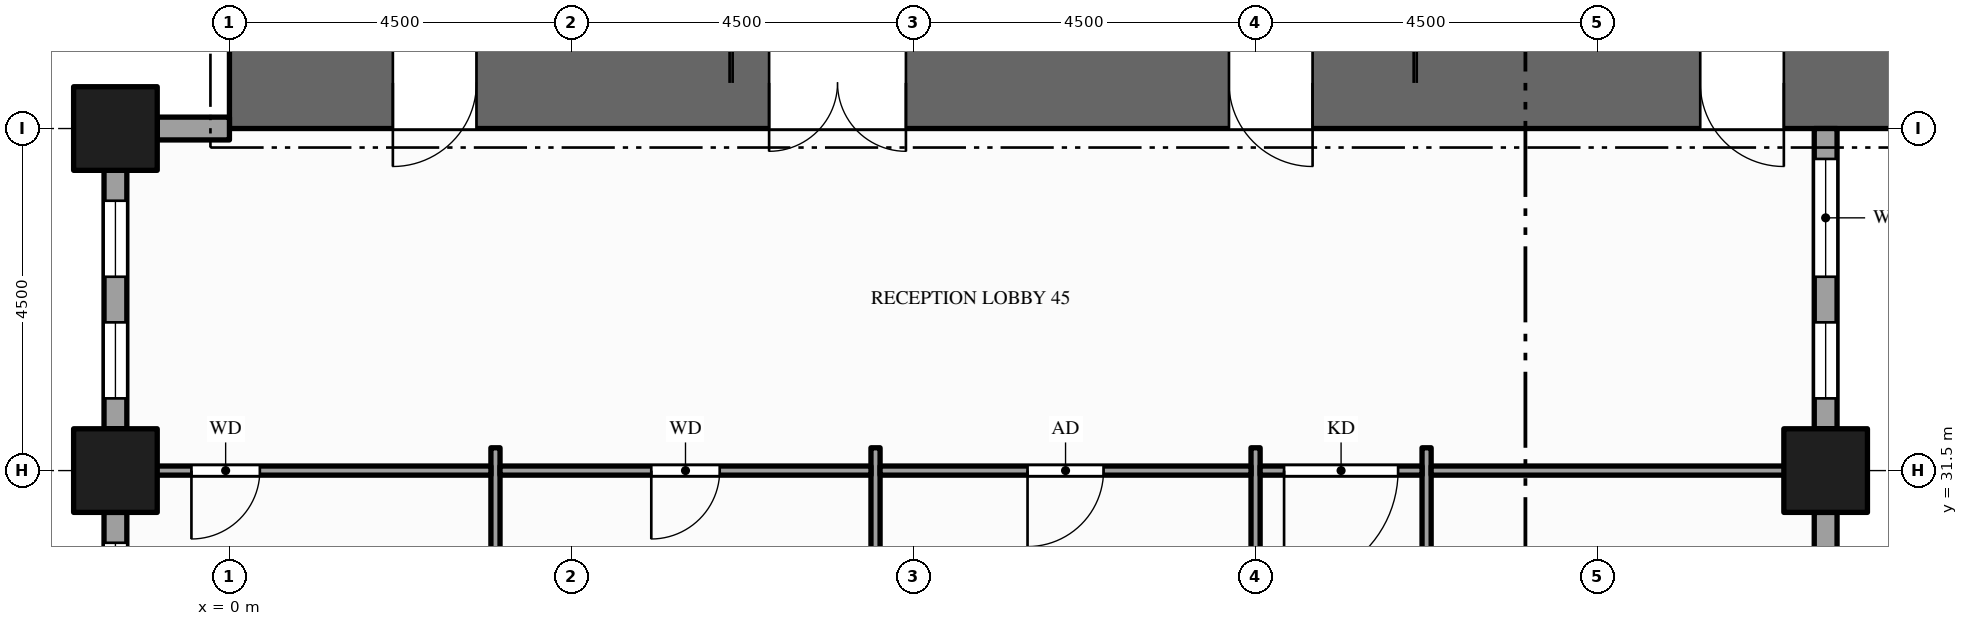
"""IFC4 building model, lengths in metres.
Left out: names, types, materials, properties, quantities, classifications, styles, units other than length and angle.
Written with IfcOpenShell. Run it as: python <this file> out.ifc"""

import sys

from ifc_helpers import new_model, si_unit, direction, frame, frame_2d, origin, origin_2d, place, context, subcontext, project, spatial, rectangle, hollow_rectangle, extrude, element, fill, save


model = new_model("IFC4")
c1 = context("Model", 3, precision=1e-05, world=origin(), true_north=direction((0.0, 1.0)))
c2 = subcontext(c1, "Body", "Model", "MODEL_VIEW")
j1 = project(units=[si_unit("LENGTHUNIT", "METRE"), si_unit("PLANEANGLEUNIT", "RADIAN")], contexts=[c1])
p1 = place(None, origin())
s1 = spatial("IfcSite", under=j1, at=p1, CompositionType="ELEMENT")
p2 = place(p1, origin())
s2 = spatial("IfcBuilding", under=s1, at=p2, CompositionType="ELEMENT")
p3 = place(p2, frame((0.0, 0.0, 61.0)))
s3 = spatial("IfcBuildingStorey", under=s2, at=p3, CompositionType="ELEMENT", Elevation=61.0)
p4 = place(p3, frame((0.0, 36.6, -0.15), z_axis=(0.0, 0.0, 1.0), x_axis=(1.0, 0.0, 0.0)))
e1 = element("IfcWall", 1, at=p4, inside=s3, PredefinedType="SHEAR", context=c2, shape_type="SweptSolid", body=[
    extrude(rectangle(XDim=22.5, YDim=1.2, at=frame_2d((11.25, 0.0))), origin(), (0.0, 0.0, 1.0), 4.0),
])
p5 = place(p4, frame((7.1, 0.0, 0.15)))
e2 = element("IfcOpeningElement", 2, at=p5, cuts=e1, PredefinedType="OPENING", context=c2, shape_type="SweptSolid", body=[
    extrude(rectangle(XDim=1.8, YDim=2.1, at=frame_2d((0.9, 1.05))), frame((0.0, 0.61, 0.0), z_axis=(0.0, -1.0, 0.0), x_axis=(1.0, 0.0, 0.0)), (0.0, 0.0, 1.0), 1.22),
])
p6 = place(p4, frame((13.15, 0.0, 0.15)))
e3 = element("IfcOpeningElement", 3, at=p6, cuts=e1, PredefinedType="OPENING", context=c2, shape_type="SweptSolid", body=[
    extrude(rectangle(XDim=1.1, YDim=2.1, at=frame_2d((0.55, 1.05))), frame((0.0, 0.61, 0.0), z_axis=(0.0, -1.0, 0.0), x_axis=(1.0, 0.0, 0.0)), (0.0, 0.0, 1.0), 1.22),
])
p7 = place(p4, frame((2.15, 0.0, 0.15)))
e4 = element("IfcOpeningElement", 4, at=p7, cuts=e1, PredefinedType="OPENING", context=c2, shape_type="SweptSolid", body=[
    extrude(rectangle(XDim=1.1, YDim=2.1, at=frame_2d((0.55, 1.05))), frame((0.0, 0.61, 0.0), z_axis=(0.0, -1.0, 0.0), x_axis=(1.0, 0.0, 0.0)), (0.0, 0.0, 1.0), 1.22),
])
p8 = place(p4, frame((19.35, 0.0, 0.15)))
e5 = element("IfcOpeningElement", 5, at=p8, cuts=e1, PredefinedType="OPENING", context=c2, shape_type="SweptSolid", body=[
    extrude(rectangle(XDim=1.1, YDim=2.1, at=frame_2d((0.55, 1.05))), frame((0.0, 0.61, 0.0), z_axis=(0.0, -1.0, 0.0), x_axis=(1.0, 0.0, 0.0)), (0.0, 0.0, 1.0), 1.22),
])
for number, where, z_axis, x_axis in (
    (6, (-1.5, 31.5, -0.15), (0.0, 0.0, 1.0), (1.0, 0.0, 0.0)),
    (7, (-1.5, 36.0, -0.15), (0.0, 0.0, 1.0), (1.0, 0.0, 0.0)),
    (8, (21.0, 31.5, -0.15), (0.0, 0.0, 1.0), (1.0, 0.0, 0.0)),
):
    element("IfcColumn", number, at=place(p3, frame(where, z_axis=z_axis, x_axis=x_axis)), inside=s3, PredefinedType="COLUMN", context=c2, shape_type="SweptSolid", body=[
        extrude(hollow_rectangle(XDim=1.1, YDim=1.1, WallThickness=0.06, at=origin_2d()), origin(), (0.0, 0.0, 1.0), 4.0),
    ])
p9 = place(p3, frame((21.0, 29.05, 0.0), z_axis=(0.0, 0.0, 1.0), x_axis=(0.0, 1.0, 0.0)))
e9 = element("IfcWall", 9, at=p9, inside=s3, PredefinedType="STANDARD", context=c2, shape_type="SweptSolid", body=[
    extrude(rectangle(XDim=1.9, YDim=0.3, at=frame_2d((0.95, 0.0))), origin(), (0.0, 0.0, 1.0), 3.144),
])
p10 = place(p3, frame((21.0, 32.05, 0.0), z_axis=(0.0, 0.0, 1.0), x_axis=(0.0, 1.0, 0.0)))
e10 = element("IfcWall", 10, at=p10, inside=s3, PredefinedType="STANDARD", context=c2, shape_type="SweptSolid", body=[
    extrude(rectangle(XDim=3.95, YDim=0.3, at=frame_2d((1.975, 0.0))), origin(), (0.0, 0.0, 1.0), 3.144),
])
p11 = place(p10, frame((0.4, 0.0, 0.9)))
e11 = element("IfcOpeningElement", 11, at=p11, cuts=e10, PredefinedType="OPENING", context=c2, shape_type="SweptSolid", body=[
    extrude(rectangle(XDim=1.0, YDim=2.0, at=frame_2d((0.5, 1.0))), frame((0.0, 0.16, 0.0), z_axis=(0.0, -1.0, 0.0), x_axis=(1.0, 0.0, 0.0)), (0.0, 0.0, 1.0), 0.32),
])
p12 = place(p10, frame((2.0, 0.0, 0.9)))
e12 = element("IfcOpeningElement", 12, at=p12, cuts=e10, PredefinedType="OPENING", context=c2, shape_type="SweptSolid", body=[
    extrude(rectangle(XDim=1.55, YDim=2.0, at=frame_2d((0.775, 1.0))), frame((0.0, 0.16, 0.0), z_axis=(0.0, -1.0, 0.0), x_axis=(1.0, 0.0, 0.0)), (0.0, 0.0, 1.0), 0.32),
])
p13 = place(p3, frame((0.0, 36.0, 0.0), z_axis=(0.0, 0.0, 1.0), x_axis=(-1.0, 0.0, 0.0)))
e13 = element("IfcWall", 13, at=p13, inside=s3, PredefinedType="STANDARD", context=c2, shape_type="SweptSolid", body=[
    extrude(rectangle(XDim=0.95, YDim=0.3, at=frame_2d((0.475, 0.0))), origin(), (0.0, 0.0, 1.0), 2.938),
])
p14 = place(p3, frame((-1.5, 35.45, 0.0), z_axis=(0.0, 0.0, 1.0), x_axis=(0.0, -1.0, 0.0)))
e14 = element("IfcWall", 14, at=p14, inside=s3, PredefinedType="STANDARD", context=c2, shape_type="SweptSolid", body=[
    extrude(rectangle(XDim=3.4, YDim=0.3, at=frame_2d((1.7, 0.0))), origin(), (0.0, 0.0, 1.0), 3.144),
])
p15 = place(p14, frame((0.4, 0.0, 0.9)))
e15 = element("IfcOpeningElement", 15, at=p15, cuts=e14, PredefinedType="OPENING", context=c2, shape_type="SweptSolid", body=[
    extrude(rectangle(XDim=1.0, YDim=2.0, at=frame_2d((0.5, 1.0))), frame((0.0, 0.16, 0.0), z_axis=(0.0, -1.0, 0.0), x_axis=(1.0, 0.0, 0.0)), (0.0, 0.0, 1.0), 0.32),
])
p16 = place(p14, frame((2.0, 0.0, 0.9)))
e16 = element("IfcOpeningElement", 16, at=p16, cuts=e14, PredefinedType="OPENING", context=c2, shape_type="SweptSolid", body=[
    extrude(rectangle(XDim=1.0, YDim=2.0, at=frame_2d((0.5, 1.0))), frame((0.0, 0.16, 0.0), z_axis=(0.0, -1.0, 0.0), x_axis=(1.0, 0.0, 0.0)), (0.0, 0.0, 1.0), 0.32),
])
p17 = place(p3, frame((-1.5, 30.95, 0.0), z_axis=(0.0, 0.0, 1.0), x_axis=(0.0, -1.0, 0.0)))
e17 = element("IfcWall", 17, at=p17, inside=s3, PredefinedType="STANDARD", context=c2, shape_type="SweptSolid", body=[
    extrude(rectangle(XDim=3.4, YDim=0.3, at=frame_2d((1.7, 0.0))), origin(), (0.0, 0.0, 1.0), 3.144),
])
p18 = place(p17, frame((0.4, 0.0, 0.9)))
e18 = element("IfcOpeningElement", 18, at=p18, cuts=e17, PredefinedType="OPENING", context=c2, shape_type="SweptSolid", body=[
    extrude(rectangle(XDim=1.0, YDim=2.0, at=frame_2d((0.5, 1.0))), frame((0.0, 0.16, 0.0), z_axis=(0.0, -1.0, 0.0), x_axis=(1.0, 0.0, 0.0)), (0.0, 0.0, 1.0), 0.32),
])
p19 = place(p17, frame((2.0, 0.0, 0.9)))
e19 = element("IfcOpeningElement", 19, at=p19, cuts=e17, PredefinedType="OPENING", context=c2, shape_type="SweptSolid", body=[
    extrude(rectangle(XDim=1.0, YDim=2.0, at=frame_2d((0.5, 1.0))), frame((0.0, 0.16, 0.0), z_axis=(0.0, -1.0, 0.0), x_axis=(1.0, 0.0, 0.0)), (0.0, 0.0, 1.0), 0.32),
])
for number, where, z_axis, x_axis in (
    (20, (3.5, 26.7, 0.0), (0.0, 0.0, 1.0), (0.0, 1.0, 0.0)),
    (21, (8.5, 26.7, 0.0), (0.0, 0.0, 1.0), (0.0, 1.0, 0.0)),
):
    element("IfcWall", number, at=place(p3, frame(where, z_axis=z_axis, x_axis=x_axis)), inside=s3, PredefinedType="PARTITIONING", context=c2, shape_type="SweptSolid", body=[
        extrude(rectangle(XDim=5.1, YDim=0.12, at=frame_2d((2.55, 0.0))), origin(), (0.0, 0.0, 1.0), 3.85),
    ])
p20 = place(p3, frame((13.5, 10.95, 0.0), z_axis=(0.0, 0.0, 1.0), x_axis=(0.0, 1.0, 0.0)))
e22 = element("IfcWall", 22, at=p20, inside=s3, PredefinedType="PARTITIONING", context=c2, shape_type="SweptSolid", body=[
    extrude(rectangle(XDim=20.85, YDim=0.12, at=frame_2d((10.425, 0.0))), origin(), (0.0, 0.0, 1.0), 2.6),
])
p21 = place(p20, frame((2.05, 0.0, 0.0)))
e23 = element("IfcOpeningElement", 23, at=p21, cuts=e22, PredefinedType="OPENING", context=c2, shape_type="SweptSolid", body=[
    extrude(rectangle(XDim=1.0, YDim=2.1, at=frame_2d((0.5, 1.05))), frame((0.0, 0.07, 0.0), z_axis=(0.0, -1.0, 0.0), x_axis=(1.0, 0.0, 0.0)), (0.0, 0.0, 1.0), 0.14),
])
p22 = place(p20, frame((6.55, 0.0, 0.0)))
e24 = element("IfcOpeningElement", 24, at=p22, cuts=e22, PredefinedType="OPENING", context=c2, shape_type="SweptSolid", body=[
    extrude(rectangle(XDim=1.0, YDim=2.1, at=frame_2d((0.5, 1.05))), frame((0.0, 0.07, 0.0), z_axis=(0.0, -1.0, 0.0), x_axis=(1.0, 0.0, 0.0)), (0.0, 0.0, 1.0), 0.14),
])
p23 = place(p20, frame((11.805, 0.0, 0.0)))
e25 = element("IfcOpeningElement", 25, at=p23, cuts=e22, PredefinedType="OPENING", context=c2, shape_type="SweptSolid", body=[
    extrude(rectangle(XDim=1.8, YDim=2.1, at=frame_2d((0.9, 1.05))), frame((0.0, 0.07, 0.0), z_axis=(0.0, -1.0, 0.0), x_axis=(1.0, 0.0, 0.0)), (0.0, 0.0, 1.0), 0.14),
])
p24 = place(p3, frame((15.75, 10.95, 0.0), z_axis=(0.0, 0.0, 1.0), x_axis=(0.0, 1.0, 0.0)))
e26 = element("IfcWall", 26, at=p24, inside=s3, PredefinedType="PARTITIONING", context=c2, shape_type="SweptSolid", body=[
    extrude(rectangle(XDim=20.85, YDim=0.12, at=frame_2d((10.425, 0.0))), origin(), (0.0, 0.0, 1.0), 2.6),
])
p25 = place(p24, frame((17.8, 0.0, 0.0)))
e27 = element("IfcOpeningElement", 27, at=p25, cuts=e26, PredefinedType="OPENING", context=c2, shape_type="SweptSolid", body=[
    extrude(rectangle(XDim=1.0, YDim=2.1, at=frame_2d((0.5, 1.05))), frame((0.0, 0.07, 0.0), z_axis=(0.0, -1.0, 0.0), x_axis=(1.0, 0.0, 0.0)), (0.0, 0.0, 1.0), 0.14),
])
p26 = place(p24, frame((4.2, 0.0, 0.0)))
e28 = element("IfcOpeningElement", 28, at=p26, cuts=e26, PredefinedType="OPENING", context=c2, shape_type="SweptSolid", body=[
    extrude(rectangle(XDim=1.2, YDim=2.1, at=frame_2d((0.6, 1.05))), frame((0.0, 0.07, 0.0), z_axis=(0.0, -1.0, 0.0), x_axis=(1.0, 0.0, 0.0)), (0.0, 0.0, 1.0), 0.14),
])
p27 = place(p3, frame((-1.35, 31.5, 0.0), z_axis=(0.0, 0.0, 1.0), x_axis=(1.0, 0.0, 0.0)))
e29 = element("IfcWall", 29, at=p27, inside=s3, PredefinedType="PARTITIONING", context=c2, shape_type="SweptSolid", body=[
    extrude(rectangle(XDim=4.79, YDim=0.12, at=frame_2d((2.395, 0.0))), origin(), (0.0, 0.0, 1.0), 2.938),
])
p28 = place(p27, frame((0.85, 0.0, 0.0)))
e30 = element("IfcOpeningElement", 30, at=p28, cuts=e29, PredefinedType="OPENING", context=c2, shape_type="SweptSolid", body=[
    extrude(rectangle(XDim=0.9, YDim=2.1, at=frame_2d((0.45, 1.05))), frame((0.0, 0.07, 0.0), z_axis=(0.0, -1.0, 0.0), x_axis=(1.0, 0.0, 0.0)), (0.0, 0.0, 1.0), 0.14),
])
p29 = place(p3, frame((3.56, 31.5, 0.0), z_axis=(0.0, 0.0, 1.0), x_axis=(1.0, 0.0, 0.0)))
e31 = element("IfcWall", 31, at=p29, inside=s3, PredefinedType="PARTITIONING", context=c2, shape_type="SweptSolid", body=[
    extrude(rectangle(XDim=4.88, YDim=0.12, at=frame_2d((2.44, 0.0))), origin(), (0.0, 0.0, 1.0), 2.938),
])
p30 = place(p29, frame((1.99, 0.0, 0.0)))
e32 = element("IfcOpeningElement", 32, at=p30, cuts=e31, PredefinedType="OPENING", context=c2, shape_type="SweptSolid", body=[
    extrude(rectangle(XDim=0.9, YDim=2.1, at=frame_2d((0.45, 1.05))), frame((0.0, 0.07, 0.0), z_axis=(0.0, -1.0, 0.0), x_axis=(1.0, 0.0, 0.0)), (0.0, 0.0, 1.0), 0.14),
])
p31 = place(p3, frame((8.56, 31.5, 0.0), z_axis=(0.0, 0.0, 1.0), x_axis=(1.0, 0.0, 0.0)))
e33 = element("IfcWall", 33, at=p31, inside=s3, PredefinedType="PARTITIONING", context=c2, shape_type="SweptSolid", body=[
    extrude(rectangle(XDim=4.88, YDim=0.12, at=frame_2d((2.44, 0.0))), origin(), (0.0, 0.0, 1.0), 2.938),
])
p32 = place(p31, frame((1.94, 0.0, 0.0)))
e34 = element("IfcOpeningElement", 34, at=p32, cuts=e33, PredefinedType="OPENING", context=c2, shape_type="SweptSolid", body=[
    extrude(rectangle(XDim=1.0, YDim=2.1, at=frame_2d((0.5, 1.05))), frame((0.0, 0.07, 0.0), z_axis=(0.0, -1.0, 0.0), x_axis=(1.0, 0.0, 0.0)), (0.0, 0.0, 1.0), 0.14),
])
p33 = place(p3, frame((13.56, 31.5, 0.0), z_axis=(0.0, 0.0, 1.0), x_axis=(1.0, 0.0, 0.0)))
e35 = element("IfcWall", 35, at=p33, inside=s3, PredefinedType="PARTITIONING", context=c2, shape_type="SweptSolid", body=[
    extrude(rectangle(XDim=2.13, YDim=0.12, at=frame_2d((1.065, 0.0))), origin(), (0.0, 0.0, 1.0), 2.938),
])
p34 = place(p33, frame((0.315, 0.0, 0.0)))
e36 = element("IfcOpeningElement", 36, at=p34, cuts=e35, PredefinedType="OPENING", context=c2, shape_type="SweptSolid", body=[
    extrude(rectangle(XDim=1.5, YDim=2.1, at=frame_2d((0.75, 1.05))), frame((0.0, 0.07, 0.0), z_axis=(0.0, -1.0, 0.0), x_axis=(1.0, 0.0, 0.0)), (0.0, 0.0, 1.0), 0.14),
])
p35 = place(p3, frame((15.81, 31.5, 0.0), z_axis=(0.0, 0.0, 1.0), x_axis=(1.0, 0.0, 0.0)))
e37 = element("IfcWall", 37, at=p35, inside=s3, PredefinedType="PARTITIONING", context=c2, shape_type="SweptSolid", body=[
    extrude(rectangle(XDim=5.04, YDim=0.12, at=frame_2d((2.52, 0.0))), origin(), (0.0, 0.0, 1.0), 2.938),
])
p36 = place(p11, origin())
e38 = element("IfcWindow", 38, at=p36, inside=s3, PartitioningType="SINGLE_PANEL", PredefinedType="WINDOW", context=c2, shape_type="SweptSolid", body=[
    extrude(rectangle(XDim=1.0, YDim=2.0, at=frame_2d((0.5, 1.0))), frame((0.0, 0.03, 0.0), z_axis=(0.0, -1.0, 0.0), x_axis=(1.0, 0.0, 0.0)), (0.0, 0.0, 1.0), 0.06),
])
fill(e11, e38)
p37 = place(p12, origin())
e39 = element("IfcWindow", 39, at=p37, inside=s3, PartitioningType="SINGLE_PANEL", PredefinedType="WINDOW", context=c2, shape_type="SweptSolid", body=[
    extrude(rectangle(XDim=1.55, YDim=2.0, at=frame_2d((0.775, 1.0))), frame((0.0, 0.03, 0.0), z_axis=(0.0, -1.0, 0.0), x_axis=(1.0, 0.0, 0.0)), (0.0, 0.0, 1.0), 0.06),
])
fill(e12, e39)
p38 = place(p15, origin())
e40 = element("IfcWindow", 40, at=p38, inside=s3, PartitioningType="SINGLE_PANEL", PredefinedType="WINDOW", context=c2, shape_type="SweptSolid", body=[
    extrude(rectangle(XDim=1.0, YDim=2.0, at=frame_2d((0.5, 1.0))), frame((0.0, 0.03, 0.0), z_axis=(0.0, -1.0, 0.0), x_axis=(1.0, 0.0, 0.0)), (0.0, 0.0, 1.0), 0.06),
])
fill(e15, e40)
p39 = place(p16, origin())
e41 = element("IfcWindow", 41, at=p39, inside=s3, PartitioningType="SINGLE_PANEL", PredefinedType="WINDOW", context=c2, shape_type="SweptSolid", body=[
    extrude(rectangle(XDim=1.0, YDim=2.0, at=frame_2d((0.5, 1.0))), frame((0.0, 0.03, 0.0), z_axis=(0.0, -1.0, 0.0), x_axis=(1.0, 0.0, 0.0)), (0.0, 0.0, 1.0), 0.06),
])
fill(e16, e41)
p40 = place(p18, origin())
e42 = element("IfcWindow", 42, at=p40, inside=s3, PartitioningType="SINGLE_PANEL", PredefinedType="WINDOW", context=c2, shape_type="SweptSolid", body=[
    extrude(rectangle(XDim=1.0, YDim=2.0, at=frame_2d((0.5, 1.0))), frame((0.0, 0.03, 0.0), z_axis=(0.0, -1.0, 0.0), x_axis=(1.0, 0.0, 0.0)), (0.0, 0.0, 1.0), 0.06),
])
fill(e18, e42)
p41 = place(p5, origin())
e43 = element("IfcDoor", 43, at=p41, inside=s3, OperationType="DOUBLE_DOOR_SINGLE_SWING", PredefinedType="DOOR", context=c2, shape_type="SweptSolid", body=[
    extrude(rectangle(XDim=1.8, YDim=2.1, at=frame_2d((0.9, 1.05))), frame((0.0, 0.025, 0.0), z_axis=(0.0, -1.0, 0.0), x_axis=(1.0, 0.0, 0.0)), (0.0, 0.0, 1.0), 0.05),
])
fill(e2, e43)
p42 = place(p6, origin())
e44 = element("IfcDoor", 44, at=p42, inside=s3, OperationType="SINGLE_SWING_RIGHT", PredefinedType="DOOR", context=c2, shape_type="SweptSolid", body=[
    extrude(rectangle(XDim=1.1, YDim=2.1, at=frame_2d((0.55, 1.05))), frame((0.0, 0.025, 0.0), z_axis=(0.0, -1.0, 0.0), x_axis=(1.0, 0.0, 0.0)), (0.0, 0.0, 1.0), 0.05),
])
fill(e3, e44)
p43 = place(p7, origin())
e45 = element("IfcDoor", 45, at=p43, inside=s3, OperationType="SINGLE_SWING_LEFT", PredefinedType="DOOR", context=c2, shape_type="SweptSolid", body=[
    extrude(rectangle(XDim=1.1, YDim=2.1, at=frame_2d((0.55, 1.05))), frame((0.0, 0.025, 0.0), z_axis=(0.0, -1.0, 0.0), x_axis=(1.0, 0.0, 0.0)), (0.0, 0.0, 1.0), 0.05),
])
fill(e4, e45)
p44 = place(p8, origin())
e46 = element("IfcDoor", 46, at=p44, inside=s3, OperationType="SINGLE_SWING_RIGHT", PredefinedType="DOOR", context=c2, shape_type="SweptSolid", body=[
    extrude(rectangle(XDim=1.1, YDim=2.1, at=frame_2d((0.55, 1.05))), frame((0.0, 0.025, 0.0), z_axis=(0.0, -1.0, 0.0), x_axis=(1.0, 0.0, 0.0)), (0.0, 0.0, 1.0), 0.05),
])
fill(e5, e46)
p45 = place(p34, origin())
e47 = element("IfcDoor", 47, at=p45, inside=s3, OperationType="SINGLE_SWING_LEFT", PredefinedType="DOOR", context=c2, shape_type="SweptSolid", body=[
    extrude(rectangle(XDim=1.5, YDim=2.1, at=frame_2d((0.75, 1.05))), frame((0.0, 0.025, 0.0), z_axis=(0.0, -1.0, 0.0), x_axis=(1.0, 0.0, 0.0)), (0.0, 0.0, 1.0), 0.05),
])
fill(e36, e47)
p46 = place(p28, origin())
e48 = element("IfcDoor", 48, at=p46, inside=s3, OperationType="SINGLE_SWING_LEFT", PredefinedType="DOOR", context=c2, shape_type="SweptSolid", body=[
    extrude(rectangle(XDim=0.9, YDim=2.1, at=frame_2d((0.45, 1.05))), frame((0.0, 0.025, 0.0), z_axis=(0.0, -1.0, 0.0), x_axis=(1.0, 0.0, 0.0)), (0.0, 0.0, 1.0), 0.05),
])
fill(e30, e48)
p47 = place(p30, origin())
e49 = element("IfcDoor", 49, at=p47, inside=s3, OperationType="SINGLE_SWING_LEFT", PredefinedType="DOOR", context=c2, shape_type="SweptSolid", body=[
    extrude(rectangle(XDim=0.9, YDim=2.1, at=frame_2d((0.45, 1.05))), frame((0.0, 0.025, 0.0), z_axis=(0.0, -1.0, 0.0), x_axis=(1.0, 0.0, 0.0)), (0.0, 0.0, 1.0), 0.05),
])
fill(e32, e49)
p48 = place(p32, origin())
e50 = element("IfcDoor", 50, at=p48, inside=s3, OperationType="SINGLE_SWING_LEFT", PredefinedType="DOOR", context=c2, shape_type="SweptSolid", body=[
    extrude(rectangle(XDim=1.0, YDim=2.1, at=frame_2d((0.5, 1.05))), frame((0.0, 0.025, 0.0), z_axis=(0.0, -1.0, 0.0), x_axis=(1.0, 0.0, 0.0)), (0.0, 0.0, 1.0), 0.05),
])
fill(e34, e50)
save(model, sys.argv[1])
